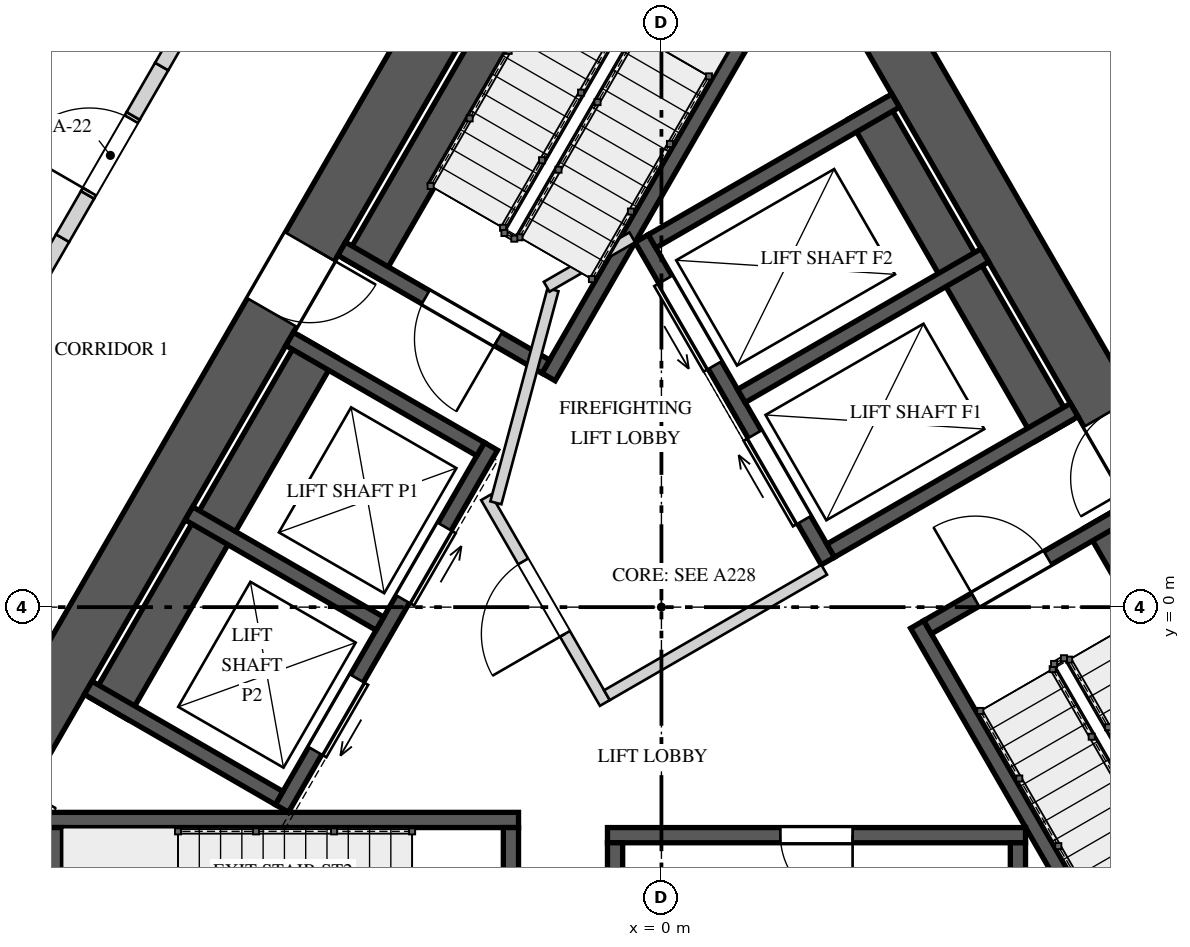
"""IFC4 building model, lengths in metres.
Left out: names, types, materials, properties, quantities, classifications, styles, units other than length and angle.
Written with IfcOpenShell. Run it as: python <this file> out.ifc"""

import sys

from ifc_helpers import new_model, si_unit, direction, frame, frame_2d, origin, place, context, subcontext, project, spatial, polyline, rectangle, outline, extrude, element, fill, save


model = new_model("IFC4")
c1 = context("Model", 3, precision=1e-05, world=origin(), true_north=direction((0.0, 1.0)))
c2 = subcontext(c1, "Body", "Model", "MODEL_VIEW")
j1 = project(units=[si_unit("LENGTHUNIT", "METRE"), si_unit("PLANEANGLEUNIT", "RADIAN")], contexts=[c1])
p1 = place(None, origin())
s1 = spatial("IfcSite", under=j1, at=p1, CompositionType="ELEMENT")
p2 = place(p1, origin())
s2 = spatial("IfcBuilding", under=s1, at=p2, CompositionType="ELEMENT")
p3 = place(p2, frame((0.0, 0.0, 200.0)))
s3 = spatial("IfcBuildingStorey", under=s2, at=p3, CompositionType="ELEMENT", Elevation=200.0)
p4 = place(p3, frame((-1.227, 10.625, 0.0), z_axis=(0.0, 0.0, 1.0), x_axis=(-0.500002161919, -0.866024155596, 0.0)))
e1 = element("IfcWall", 1, at=p4, inside=s3, PredefinedType="SHEAR", context=c2, shape_type="SweptSolid", body=[
    extrude(rectangle(XDim=17.176, YDim=0.75, at=frame_2d((8.588, 0.0))), origin(), (0.0, 0.0, 1.0), 4.0),
])
p5 = place(p4, frame((6.793, 0.0, 0.0)))
e2 = element("IfcOpeningElement", 2, at=p5, cuts=e1, PredefinedType="OPENING", context=c2, shape_type="SweptSolid", body=[
    extrude(rectangle(XDim=1.0, YDim=2.4, at=frame_2d((0.5, 1.2))), frame((0.0, 0.385, 0.0), z_axis=(0.0, -1.0, 0.0), x_axis=(1.0, 0.0, 0.0)), (0.0, 0.0, 1.0), 0.77),
])
p6 = place(p4, frame((14.864, 0.0, 0.0)))
e3 = element("IfcOpeningElement", 3, at=p6, cuts=e1, PredefinedType="OPENING", context=c2, shape_type="SweptSolid", body=[
    extrude(rectangle(XDim=0.8, YDim=2.1, at=frame_2d((0.4, 1.05))), frame((0.0, 0.385, 0.0), z_axis=(0.0, -1.0, 0.0), x_axis=(1.0, 0.0, 0.0)), (0.0, 0.0, 1.0), 0.77),
])
p7 = place(p3, frame((9.815, -4.25, 0.0), z_axis=(0.0, 0.0, 1.0), x_axis=(-0.500002161919, 0.866024155596, 0.0)))
e4 = element("IfcWall", 4, at=p7, inside=s3, PredefinedType="SHEAR", context=c2, shape_type="SweptSolid", body=[
    extrude(rectangle(XDim=17.176, YDim=0.75, at=frame_2d((8.588, 0.0))), origin(), (0.0, 0.0, 1.0), 4.0),
])
p8 = place(p7, frame((6.863, 0.0, 0.0)))
e5 = element("IfcOpeningElement", 5, at=p8, cuts=e4, PredefinedType="OPENING", context=c2, shape_type="SweptSolid", body=[
    extrude(rectangle(XDim=1.0, YDim=2.4, at=frame_2d((0.5, 1.2))), frame((0.0, 0.385, 0.0), z_axis=(0.0, -1.0, 0.0), x_axis=(1.0, 0.0, 0.0)), (0.0, 0.0, 1.0), 0.77),
])
p9 = place(p3, frame((-0.831, 9.81, 0.0), z_axis=(0.0, 0.0, 1.0), x_axis=(-0.500009909098, -0.866019682689, 0.0)))
e6 = element("IfcWall", 6, at=p9, inside=s3, PredefinedType="SOLIDWALL", context=c2, shape_type="SweptSolid", body=[
    extrude(rectangle(XDim=6.2, YDim=0.55, at=frame_2d((3.1, 0.0))), origin(), (0.0, 0.0, 1.0), 3.65),
])
p10 = place(p3, frame((1.847, 8.8, 0.0), z_axis=(0.0, 0.0, 1.0), x_axis=(-0.499980354584, -0.866036745774, 0.0)))
e7 = element("IfcWall", 7, at=p10, inside=s3, PredefinedType="SOLIDWALL", context=c2, shape_type="SweptSolid", body=[
    extrude(rectangle(XDim=6.665, YDim=0.2, at=frame_2d((3.333, 0.0))), origin(), (0.0, 0.0, 1.0), 3.65),
])
p11 = place(p3, frame((-1.521, 3.165, 0.0), z_axis=(0.0, 0.0, 1.0), x_axis=(-0.86600983753, 0.500026960575, 0.0)))
e8 = element("IfcWall", 8, at=p11, inside=s3, PredefinedType="SOLIDWALL", context=c2, shape_type="SweptSolid", body=[
    extrude(rectangle(XDim=3.1, YDim=0.2, at=frame_2d((1.55, 0.0))), origin(), (0.0, 0.0, 1.0), 3.65),
])
p12 = place(p11, frame((0.725, 0.0, 0.0)))
e9 = element("IfcOpeningElement", 9, at=p12, cuts=e8, PredefinedType="OPENING", context=c2, shape_type="SweptSolid", body=[
    extrude(rectangle(XDim=1.1, YDim=2.4, at=frame_2d((0.55, 1.2))), frame((0.0, 0.11, 0.0), z_axis=(0.0, -1.0, 0.0), x_axis=(1.0, 0.0, 0.0)), (0.0, 0.0, 1.0), 0.22),
])
p13 = place(p3, frame((-8.545, -2.8, 0.0), z_axis=(0.0, 0.0, 1.0), x_axis=(1.0, 0.0, 0.0)))
e10 = element("IfcWall", 10, at=p13, inside=s3, PredefinedType="SOLIDWALL", context=c2, shape_type="SweptSolid", body=[
    extrude(rectangle(XDim=6.665, YDim=0.2, at=frame_2d((3.333, 0.0))), origin(), (0.0, 0.0, 1.0), 3.65),
])
p14 = place(p3, frame((-7.98, -2.9, 0.0), z_axis=(0.0, 0.0, 1.0), x_axis=(0.0, -1.0, 0.0)))
e11 = element("IfcWall", 11, at=p14, inside=s3, PredefinedType="SOLIDWALL", context=c2, shape_type="SweptSolid", body=[
    extrude(rectangle(XDim=3.1, YDim=0.2, at=frame_2d((1.55, 0.0))), origin(), (0.0, 0.0, 1.0), 3.65),
])
p15 = place(p3, frame((-1.98, -2.9, 0.0), z_axis=(0.0, 0.0, 1.0), x_axis=(0.0, -1.0, 0.0)))
e12 = element("IfcWall", 12, at=p15, inside=s3, PredefinedType="SOLIDWALL", context=c2, shape_type="SweptSolid", body=[
    extrude(rectangle(XDim=3.1, YDim=0.2, at=frame_2d((1.55, 0.0))), origin(), (0.0, 0.0, 1.0), 3.65),
])
p16 = place(p15, frame((0.725, 0.0, 0.0)))
e13 = element("IfcOpeningElement", 13, at=p16, cuts=e12, PredefinedType="OPENING", context=c2, shape_type="SweptSolid", body=[
    extrude(rectangle(XDim=1.1, YDim=2.4, at=frame_2d((0.55, 1.2))), frame((0.0, 0.11, 0.0), z_axis=(0.0, -1.0, 0.0), x_axis=(1.0, 0.0, 0.0)), (0.0, 0.0, 1.0), 0.22),
])
p17 = place(p3, frame((8.911, -4.185, 0.0), z_axis=(0.0, 0.0, 1.0), x_axis=(-0.500009909098, 0.866019682689, 0.0)))
e14 = element("IfcWall", 14, at=p17, inside=s3, PredefinedType="SOLIDWALL", context=c2, shape_type="SweptSolid", body=[
    extrude(rectangle(XDim=6.2, YDim=0.55, at=frame_2d((3.1, 0.0))), origin(), (0.0, 0.0, 1.0), 3.65),
])
p18 = place(p3, frame((6.697, -6.0, 0.0), z_axis=(0.0, 0.0, 1.0), x_axis=(-0.499980354584, 0.866036745774, 0.0)))
e15 = element("IfcWall", 15, at=p18, inside=s3, PredefinedType="SOLIDWALL", context=c2, shape_type="SweptSolid", body=[
    extrude(rectangle(XDim=6.665, YDim=0.2, at=frame_2d((3.333, 0.0))), origin(), (0.0, 0.0, 1.0), 3.65),
])
p19 = place(p3, frame((3.501, -0.265, 0.0), z_axis=(0.0, 0.0, 1.0), x_axis=(0.866043940782, 0.499967891604, 0.0)))
e16 = element("IfcWall", 16, at=p19, inside=s3, PredefinedType="SOLIDWALL", context=c2, shape_type="SweptSolid", body=[
    extrude(rectangle(XDim=3.1, YDim=0.2, at=frame_2d((1.55, 0.0))), origin(), (0.0, 0.0, 1.0), 3.65),
])
p20 = place(p19, frame((0.725, 0.0, 0.0)))
e17 = element("IfcOpeningElement", 17, at=p20, cuts=e16, PredefinedType="OPENING", context=c2, shape_type="SweptSolid", body=[
    extrude(rectangle(XDim=1.1, YDim=2.4, at=frame_2d((0.55, 1.2))), frame((0.0, 0.11, 0.0), z_axis=(0.0, -1.0, 0.0), x_axis=(1.0, 0.0, 0.0)), (0.0, 0.0, 1.0), 0.22),
])
p21 = place(p3, frame((-2.243, 2.115, 0.0), z_axis=(0.0, 0.0, 1.0), x_axis=(-0.499996545922, -0.866027397988, 0.0)))
e18 = element("IfcWall", 18, at=p21, inside=s3, PredefinedType="SOLIDWALL", context=c2, shape_type="SweptSolid", body=[
    extrude(rectangle(XDim=5.5, YDim=0.2, at=frame_2d((2.75, 0.0))), origin(), (0.0, 0.0, 1.0), 3.65),
])
p22 = place(p21, frame((1.22, 0.0, 0.0)))
e19 = element("IfcOpeningElement", 19, at=p22, cuts=e18, PredefinedType="OPENING", context=c2, shape_type="SweptSolid", body=[
    extrude(rectangle(XDim=1.1, YDim=2.1, at=frame_2d((0.55, 1.05))), frame((0.0, 0.11, 0.0), z_axis=(0.0, -1.0, 0.0), x_axis=(1.0, 0.0, 0.0)), (0.0, 0.0, 1.0), 0.22),
])
p23 = place(p21, frame((3.525, 0.0, 0.0)))
e20 = element("IfcOpeningElement", 20, at=p23, cuts=e18, PredefinedType="OPENING", context=c2, shape_type="SweptSolid", body=[
    extrude(rectangle(XDim=1.1, YDim=2.1, at=frame_2d((0.55, 1.05))), frame((0.0, 0.11, 0.0), z_axis=(0.0, -1.0, 0.0), x_axis=(1.0, 0.0, 0.0)), (0.0, 0.0, 1.0), 0.22),
])
p24 = place(p3, frame((-4.516, 3.427, 0.0), z_axis=(0.0, 0.0, 1.0), x_axis=(-0.499996545922, -0.866027397988, 0.0)))
e21 = element("IfcWall", 21, at=p24, inside=s3, PredefinedType="SOLIDWALL", context=c2, shape_type="SweptSolid", body=[
    extrude(rectangle(XDim=5.5, YDim=0.55, at=frame_2d((2.75, 0.0))), origin(), (0.0, 0.0, 1.0), 3.65),
])
p25 = place(p3, frame((-2.38, 2.078, 0.0), z_axis=(0.0, 0.0, 1.0), x_axis=(-0.866032775405, 0.499987231761, 0.0)))
e22 = element("IfcWall", 22, at=p25, inside=s3, PredefinedType="SOLIDWALL", context=c2, shape_type="SweptSolid", body=[
    extrude(rectangle(XDim=2.9, YDim=0.2, at=frame_2d((1.45, 0.0))), origin(), (0.0, 0.0, 1.0), 3.65),
])
p26 = place(p3, frame((-3.705, -0.217, 0.0), z_axis=(0.0, 0.0, 1.0), x_axis=(-0.865996321171, 0.50005036918, 0.0)))
e23 = element("IfcWall", 23, at=p26, inside=s3, PredefinedType="SOLIDWALL", context=c2, shape_type="SweptSolid", body=[
    extrude(rectangle(XDim=2.9, YDim=0.2, at=frame_2d((1.45, 0.0))), origin(), (0.0, 0.0, 1.0), 3.65),
])
p27 = place(p3, frame((-5.03, -2.512, 0.0), z_axis=(0.0, 0.0, 1.0), x_axis=(-0.866032775405, 0.499987231761, 0.0)))
e24 = element("IfcWall", 24, at=p27, inside=s3, PredefinedType="SOLIDWALL", context=c2, shape_type="SweptSolid", body=[
    extrude(rectangle(XDim=2.9, YDim=0.2, at=frame_2d((1.45, 0.0))), origin(), (0.0, 0.0, 1.0), 3.65),
])
p28 = place(p3, frame((4.79, -3.0, 0.0), z_axis=(0.0, 0.0, 1.0), x_axis=(-1.0, 0.0, 0.0)))
e25 = element("IfcWall", 25, at=p28, inside=s3, PredefinedType="SOLIDWALL", context=c2, shape_type="SweptSolid", body=[
    extrude(rectangle(XDim=5.5, YDim=0.2, at=frame_2d((2.75, 0.0))), origin(), (0.0, 0.0, 1.0), 3.65),
])
p29 = place(p28, frame((2.275, 0.0, 0.0)))
e26 = element("IfcOpeningElement", 26, at=p29, cuts=e25, PredefinedType="OPENING", context=c2, shape_type="SweptSolid", body=[
    extrude(rectangle(XDim=0.95, YDim=2.4, at=frame_2d((0.475, 1.2))), frame((0.0, 0.11, 0.0), z_axis=(0.0, -1.0, 0.0), x_axis=(1.0, 0.0, 0.0)), (0.0, 0.0, 1.0), 0.22),
])
for number, where, z_axis, x_axis in (
    (27, (-0.61, -3.1, 0.0), (0.0, 0.0, 1.0), (0.0, -1.0, 0.0)),
    (28, (4.69, -3.1, 0.0), (0.0, 0.0, 1.0), (0.0, -1.0, 0.0)),
):
    element("IfcWall", number, at=place(p3, frame(where, z_axis=z_axis, x_axis=x_axis)), inside=s3, PredefinedType="SOLIDWALL", context=c2, shape_type="SweptSolid", body=[
        extrude(rectangle(XDim=2.9, YDim=0.2, at=frame_2d((1.45, 0.0))), origin(), (0.0, 0.0, 1.0), 3.65),
    ])
p30 = place(p3, frame((2.19, 0.606, 0.0), z_axis=(0.0, 0.0, 1.0), x_axis=(-0.500002801628, 0.866023786258, 0.0)))
e29 = element("IfcWall", 29, at=p30, inside=s3, PredefinedType="SOLIDWALL", context=c2, shape_type="SweptSolid", body=[
    extrude(rectangle(XDim=4.9, YDim=0.2, at=frame_2d((2.45, 0.0))), origin(), (0.0, 0.0, 1.0), 3.65),
])
p31 = place(p30, frame((0.625, 0.0, 0.0)))
e30 = element("IfcOpeningElement", 30, at=p31, cuts=e29, PredefinedType="OPENING", context=c2, shape_type="SweptSolid", body=[
    extrude(rectangle(XDim=1.3, YDim=2.1, at=frame_2d((0.65, 1.05))), frame((0.0, 0.11, 0.0), z_axis=(0.0, -1.0, 0.0), x_axis=(1.0, 0.0, 0.0)), (0.0, 0.0, 1.0), 0.22),
])
p32 = place(p30, frame((2.975, 0.0, 0.0)))
e31 = element("IfcOpeningElement", 31, at=p32, cuts=e29, PredefinedType="OPENING", context=c2, shape_type="SweptSolid", body=[
    extrude(rectangle(XDim=1.3, YDim=2.1, at=frame_2d((0.65, 1.05))), frame((0.0, 0.11, 0.0), z_axis=(0.0, -1.0, 0.0), x_axis=(1.0, 0.0, 0.0)), (0.0, 0.0, 1.0), 0.22),
])
p33 = place(p3, frame((5.156, 2.319, 0.0), z_axis=(0.0, 0.0, 1.0), x_axis=(-0.500018594424, 0.866014668023, 0.0)))
e32 = element("IfcWall", 32, at=p33, inside=s3, PredefinedType="SOLIDWALL", context=c2, shape_type="SweptSolid", body=[
    extrude(rectangle(XDim=4.9, YDim=0.55, at=frame_2d((2.45, 0.0))), origin(), (0.0, 0.0, 1.0), 3.65),
])
for number, where, z_axis, x_axis in (
    (33, (2.227, 0.743, 0.0), (0.0, 0.0, 1.0), (0.866, 0.5, 0.0)),
    (34, (1.052, 2.778, 0.0), (0.0, 0.0, 1.0), (0.866, 0.5, 0.0)),
):
    element("IfcWall", number, at=place(p3, frame(where, z_axis=z_axis, x_axis=x_axis)), inside=s3, PredefinedType="SOLIDWALL", context=c2, shape_type="SweptSolid", body=[
        extrude(rectangle(XDim=3.7, YDim=0.2, at=frame_2d((1.85, 0.0))), origin(), (0.0, 0.0, 1.0), 3.65),
    ])
p34 = place(p3, frame((-0.123, 4.813, 0.0), z_axis=(0.0, 0.0, 1.0), x_axis=(0.866000971088, 0.500042316284, 0.0)))
e35 = element("IfcWall", 35, at=p34, inside=s3, PredefinedType="SOLIDWALL", context=c2, shape_type="SweptSolid", body=[
    extrude(rectangle(XDim=3.7, YDim=0.2, at=frame_2d((1.85, 0.0))), origin(), (0.0, 0.0, 1.0), 3.65),
])
p35 = place(p3, frame((-0.744, -1.261, 0.0), z_axis=(0.0, 0.0, 1.0), x_axis=(-0.500004234368, 0.866022959057, 0.0)))
e36 = element("IfcWall", 36, at=p35, inside=s3, PredefinedType="PARTITIONING", context=c2, shape_type="SweptSolid", body=[
    extrude(rectangle(XDim=3.125, YDim=0.15, at=frame_2d((1.562, 0.0))), origin(), (0.0, 0.0, 1.0), 3.65),
])
p36 = place(p35, frame((1.05, 0.0, 0.0)))
e37 = element("IfcOpeningElement", 37, at=p36, cuts=e36, PredefinedType="OPENING", context=c2, shape_type="SweptSolid", body=[
    extrude(rectangle(XDim=1.1, YDim=2.4, at=frame_2d((0.55, 1.2))), frame((0.0, 0.085, 0.0), z_axis=(0.0, -1.0, 0.0), x_axis=(1.0, 0.0, 0.0)), (0.0, 0.0, 1.0), 0.17),
])
p37 = place(p3, frame((-0.717, -1.159, 0.0), z_axis=(0.0, 0.0, 1.0), x_axis=(0.866008176907, 0.50002983664, 0.0)))
e38 = element("IfcWall", 38, at=p37, inside=s3, PredefinedType="PARTITIONING", context=c2, shape_type="SweptSolid", body=[
    extrude(rectangle(XDim=3.3, YDim=0.15, at=frame_2d((1.65, 0.0))), origin(), (0.0, 0.0, 1.0), 3.65),
])
p38 = place(p3, frame((-2.178, 1.372, 0.0), z_axis=(0.0, 0.0, 1.0), x_axis=(0.258808958833, 0.96592852884, 0.0)))
e39 = element("IfcWall", 39, at=p38, inside=s3, PredefinedType="PARTITIONING", context=c2, shape_type="SweptSolid", body=[
    extrude(rectangle(XDim=2.903, YDim=0.15, at=frame_2d((1.451, 0.0))), origin(), (0.0, 0.0, 1.0), 3.65),
])
p39 = place(p3, frame((-1.51, 4.215, 0.0), z_axis=(0.0, 0.0, 1.0), x_axis=(0.866085525409, 0.49989585183, 0.0)))
e40 = element("IfcWall", 40, at=p39, inside=s3, PredefinedType="PARTITIONING", context=c2, shape_type="SweptSolid", body=[
    extrude(rectangle(XDim=1.3, YDim=0.15, at=frame_2d((0.65, 0.0))), origin(), (0.0, 0.0, 1.0), 3.65),
])
p40 = place(p3, frame((-8.278, 4.162, 0.0), z_axis=(0.0, 0.0, 1.0), x_axis=(0.500109828528, 0.865961984968, 0.0)))
e41 = element("IfcWall", 41, at=p40, inside=s3, PredefinedType="SOLIDWALL", context=c2, shape_type="SweptSolid", body=[
    extrude(rectangle(XDim=0.8, YDim=0.2, at=frame_2d((0.4, 0.0))), origin(), (0.0, 0.0, 1.0), 2.75),
])
p41 = place(p3, frame((-7.878, 4.854, 0.0), z_axis=(0.0, 0.0, 1.0), x_axis=(0.499776065732, 0.866154653697, 0.0)))
e42 = element("IfcWall", 42, at=p41, inside=s3, PredefinedType="SOLIDWALL", context=c2, shape_type="SweptSolid", body=[
    extrude(rectangle(XDim=0.657, YDim=0.2, at=frame_2d((0.329, 0.0))), origin(), (0.0, 0.0, 1.0), 3.65),
])
p42 = place(p3, frame((-7.55, 5.424, 0.0), z_axis=(0.0, 0.0, 1.0), x_axis=(0.500033551112, 0.866006032174, 0.0)))
e43 = element("IfcWall", 43, at=p42, inside=s3, PredefinedType="SOLIDWALL", context=c2, shape_type="SweptSolid", body=[
    extrude(outline(polyline([(0.0, 0.0), (1.2, 0.0), (1.2, 2.55), (0.267, 2.55), (0.267, 3.65), (0.0, 3.65), (0.0, 0.0)])), frame((0.0, 0.1, 0.0), z_axis=(0.0, -1.0, 0.0), x_axis=(1.0, 0.0, 0.0)), (0.0, 0.0, 1.0), 0.2),
])
p43 = place(p42, frame((0.05, 0.0, 0.0)))
e44 = element("IfcOpeningElement", 44, at=p43, cuts=e43, PredefinedType="OPENING", context=c2, shape_type="SweptSolid", body=[
    extrude(rectangle(XDim=1.1, YDim=2.4, at=frame_2d((0.55, 1.2))), frame((0.0, 0.11, 0.0), z_axis=(0.0, -1.0, 0.0), x_axis=(1.0, 0.0, 0.0)), (0.0, 0.0, 1.0), 0.22),
])
p44 = place(p3, frame((-6.95, 6.463, 0.0), z_axis=(0.0, 0.0, 1.0), x_axis=(0.50020163859, 0.865908956387, 0.0)))
e45 = element("IfcWall", 45, at=p44, inside=s3, PredefinedType="SOLIDWALL", context=c2, shape_type="SweptSolid", body=[
    extrude(rectangle(XDim=0.75, YDim=0.2, at=frame_2d((0.375, 0.0))), origin(), (0.0, 0.0, 1.0), 3.65),
])
p45 = place(p3, frame((-6.575, 7.112, 0.0), z_axis=(0.0, 0.0, 1.0), x_axis=(0.499869636591, 0.866100656052, 0.0)))
e46 = element("IfcWall", 46, at=p45, inside=s3, PredefinedType="SOLIDWALL", context=c2, shape_type="SweptSolid", body=[
    extrude(rectangle(XDim=0.957, YDim=0.2, at=frame_2d((0.479, 0.0))), origin(), (0.0, 0.0, 1.0), 2.55),
])
p46 = place(p12, origin())
e47 = element("IfcDoor", 47, at=p46, inside=s3, OperationType="SINGLE_SWING_RIGHT", PredefinedType="DOOR", context=c2, shape_type="SweptSolid", body=[
    extrude(rectangle(XDim=1.1, YDim=2.4, at=frame_2d((0.55, 1.2))), frame((0.0, 0.025, 0.0), z_axis=(0.0, -1.0, 0.0), x_axis=(1.0, 0.0, 0.0)), (0.0, 0.0, 1.0), 0.05),
])
fill(e9, e47)
p47 = place(p20, origin())
e48 = element("IfcDoor", 48, at=p47, inside=s3, OperationType="SINGLE_SWING_RIGHT", PredefinedType="DOOR", context=c2, shape_type="SweptSolid", body=[
    extrude(rectangle(XDim=1.1, YDim=2.4, at=frame_2d((0.55, 1.2))), frame((0.0, 0.025, 0.0), z_axis=(0.0, -1.0, 0.0), x_axis=(1.0, 0.0, 0.0)), (0.0, 0.0, 1.0), 0.05),
])
fill(e17, e48)
p48 = place(p22, origin())
e49 = element("IfcDoor", 49, at=p48, inside=s3, OperationType="SLIDING_TO_LEFT", PredefinedType="DOOR", context=c2, shape_type="SweptSolid", body=[
    extrude(rectangle(XDim=1.1, YDim=2.1, at=frame_2d((0.55, 1.05))), frame((0.0, 0.025, 0.0), z_axis=(0.0, -1.0, 0.0), x_axis=(1.0, 0.0, 0.0)), (0.0, 0.0, 1.0), 0.05),
])
fill(e19, e49)
p49 = place(p23, origin())
e50 = element("IfcDoor", 50, at=p49, inside=s3, OperationType="SLIDING_TO_RIGHT", PredefinedType="DOOR", context=c2, shape_type="SweptSolid", body=[
    extrude(rectangle(XDim=1.1, YDim=2.1, at=frame_2d((0.55, 1.05))), frame((0.0, 0.025, 0.0), z_axis=(0.0, -1.0, 0.0), x_axis=(1.0, 0.0, 0.0)), (0.0, 0.0, 1.0), 0.05),
])
fill(e20, e50)
p50 = place(p29, origin())
e51 = element("IfcDoor", 51, at=p50, inside=s3, OperationType="SINGLE_SWING_LEFT", PredefinedType="DOOR", context=c2, shape_type="SweptSolid", body=[
    extrude(rectangle(XDim=0.95, YDim=2.4, at=frame_2d((0.475, 1.2))), frame((0.0, 0.025, 0.0), z_axis=(0.0, -1.0, 0.0), x_axis=(1.0, 0.0, 0.0)), (0.0, 0.0, 1.0), 0.05),
])
fill(e26, e51)
p51 = place(p31, origin())
e52 = element("IfcDoor", 52, at=p51, inside=s3, OperationType="SLIDING_TO_RIGHT", PredefinedType="DOOR", context=c2, shape_type="SweptSolid", body=[
    extrude(rectangle(XDim=1.3, YDim=2.1, at=frame_2d((0.65, 1.05))), frame((0.0, 0.025, 0.0), z_axis=(0.0, -1.0, 0.0), x_axis=(1.0, 0.0, 0.0)), (0.0, 0.0, 1.0), 0.05),
])
fill(e30, e52)
p52 = place(p32, origin())
e53 = element("IfcDoor", 53, at=p52, inside=s3, OperationType="SLIDING_TO_LEFT", PredefinedType="DOOR", context=c2, shape_type="SweptSolid", body=[
    extrude(rectangle(XDim=1.3, YDim=2.1, at=frame_2d((0.65, 1.05))), frame((0.0, 0.025, 0.0), z_axis=(0.0, -1.0, 0.0), x_axis=(1.0, 0.0, 0.0)), (0.0, 0.0, 1.0), 0.05),
])
fill(e31, e53)
p53 = place(p36, origin())
e54 = element("IfcDoor", 54, at=p53, inside=s3, OperationType="SINGLE_SWING_RIGHT", PredefinedType="DOOR", context=c2, shape_type="SweptSolid", body=[
    extrude(rectangle(XDim=1.1, YDim=2.4, at=frame_2d((0.55, 1.2))), frame((0.0, 0.025, 0.0), z_axis=(0.0, -1.0, 0.0), x_axis=(1.0, 0.0, 0.0)), (0.0, 0.0, 1.0), 0.05),
])
fill(e37, e54)
p54 = place(p5, origin())
e55 = element("IfcDoor", 55, at=p54, inside=s3, OperationType="SINGLE_SWING_LEFT", PredefinedType="DOOR", context=c2, shape_type="SweptSolid", body=[
    extrude(rectangle(XDim=1.0, YDim=2.4, at=frame_2d((0.5, 1.2))), frame((0.0, 0.025, 0.0), z_axis=(0.0, -1.0, 0.0), x_axis=(1.0, 0.0, 0.0)), (0.0, 0.0, 1.0), 0.05),
])
fill(e2, e55)
p55 = place(p8, origin())
e56 = element("IfcDoor", 56, at=p55, inside=s3, OperationType="SINGLE_SWING_LEFT", PredefinedType="DOOR", context=c2, shape_type="SweptSolid", body=[
    extrude(rectangle(XDim=1.0, YDim=2.4, at=frame_2d((0.5, 1.2))), frame((0.0, 0.025, 0.0), z_axis=(0.0, -1.0, 0.0), x_axis=(1.0, 0.0, 0.0)), (0.0, 0.0, 1.0), 0.05),
])
fill(e5, e56)
p56 = place(p43, origin())
e57 = element("IfcDoor", 57, at=p56, inside=s3, OperationType="SINGLE_SWING_RIGHT", PredefinedType="DOOR", context=c2, shape_type="SweptSolid", body=[
    extrude(rectangle(XDim=1.1, YDim=2.4, at=frame_2d((0.55, 1.2))), frame((0.0, 0.025, 0.0), z_axis=(0.0, -1.0, 0.0), x_axis=(1.0, 0.0, 0.0)), (0.0, 0.0, 1.0), 0.05),
])
fill(e44, e57)
save(model, sys.argv[1])
